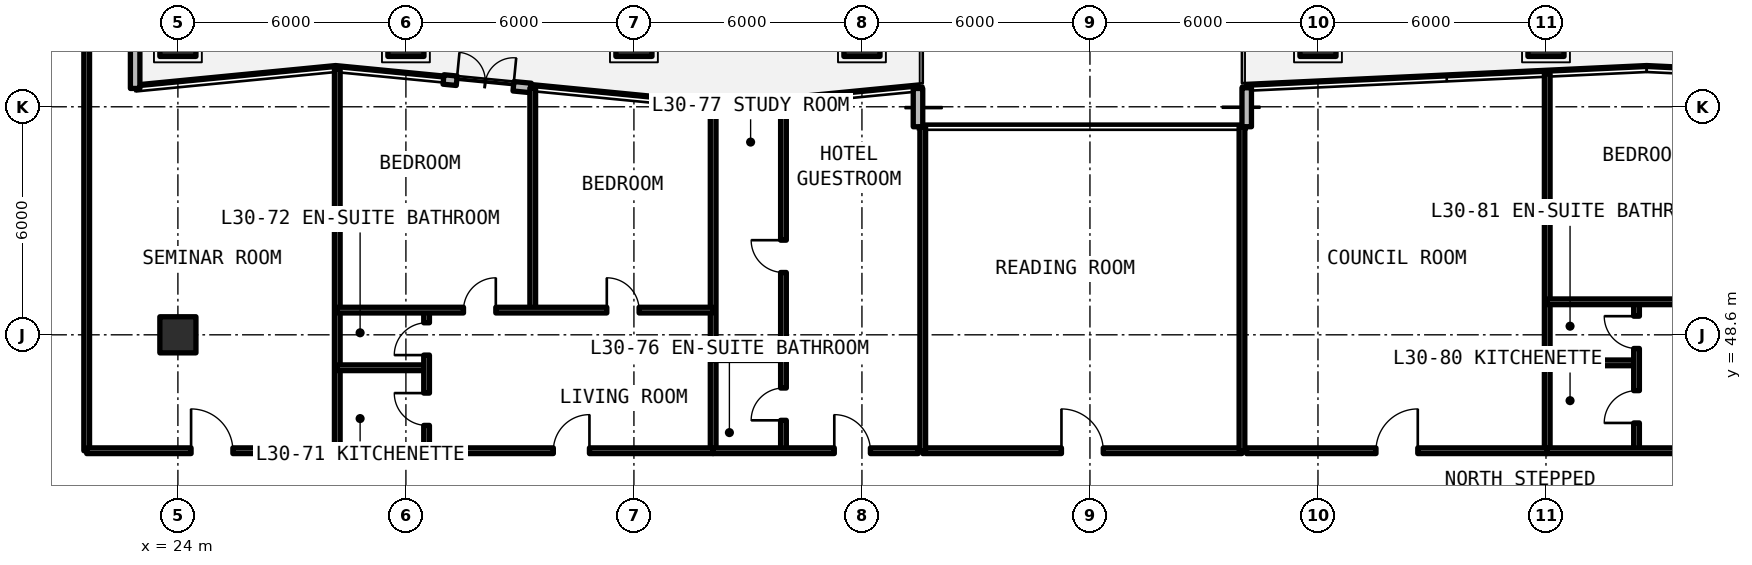
"""IFC4 building model, lengths in metres.
Left out: names, types, materials, properties, quantities, classifications, styles, units other than length and angle.
Written with IfcOpenShell. Run it as: python <this file> out.ifc"""

import sys

from ifc_helpers import new_model, si_unit, direction, frame, frame_2d, origin, origin_2d, place, context, subcontext, project, spatial, rectangle, extrude, element, fill, save


model = new_model("IFC4")
c1 = context("Model", 3, precision=1e-05, world=origin(), true_north=direction((0.0, 1.0)))
c2 = subcontext(c1, "Body", "Model", "MODEL_VIEW")
j1 = project(units=[si_unit("LENGTHUNIT", "METRE"), si_unit("PLANEANGLEUNIT", "RADIAN")], contexts=[c1])
p1 = place(None, origin())
s1 = spatial("IfcSite", under=j1, at=p1, CompositionType="ELEMENT")
p2 = place(p1, origin())
s2 = spatial("IfcBuilding", under=s1, at=p2, CompositionType="ELEMENT")
p3 = place(p2, frame((0.0, 0.0, 108.57)))
s3 = spatial("IfcBuildingStorey", under=s2, at=p3, CompositionType="ELEMENT", Elevation=108.57)
for number, where, z_axis, x_axis in (
    (1, (24.0, 48.6, 0.0), (0.0, 0.0, 1.0), (1.0, 0.0, 0.0)),
    (2, (24.0, 56.4, 0.0), (0.0, 0.0, 1.0), (1.0, 0.0, 0.0)),
    (3, (30.0, 56.4, 0.0), (0.0, 0.0, 1.0), (1.0, 0.0, 0.0)),
    (4, (36.0, 56.4, 0.0), (0.0, 0.0, 1.0), (1.0, 0.0, 0.0)),
    (5, (42.0, 56.4, 0.0), (0.0, 0.0, 1.0), (1.0, 0.0, 0.0)),
    (6, (54.0, 56.4, 0.0), (0.0, 0.0, 1.0), (1.0, 0.0, 0.0)),
    (7, (60.0, 56.4, 0.0), (0.0, 0.0, 1.0), (1.0, 0.0, 0.0)),
):
    element("IfcColumn", number, at=place(p3, frame(where, z_axis=z_axis, x_axis=x_axis)), inside=s3, PredefinedType="COLUMN", context=c2, shape_type="SweptSolid", body=[
        extrude(rectangle(XDim=0.95, YDim=0.95, at=origin_2d()), origin(), (0.0, 0.0, 1.0), 3.63),
    ])
p4 = place(p3, frame((52.125, 55.101, 0.0), z_axis=(0.0, 0.0, 1.0), x_axis=(0.0, -1.0, 0.0)))
e8 = element("IfcWall", 8, at=p4, inside=s3, PredefinedType="SOLIDWALL", context=c2, shape_type="SweptSolid", body=[
    extrude(rectangle(XDim=1.026, YDim=0.25, at=frame_2d((0.513, 0.0))), origin(), (0.0, 0.0, 1.0), 3.41),
])
p5 = place(p3, frame((43.475, 54.075, 0.0), z_axis=(0.0, 0.0, 1.0), x_axis=(0.0, 1.0, 0.0)))
e9 = element("IfcWall", 9, at=p5, inside=s3, PredefinedType="SOLIDWALL", context=c2, shape_type="SweptSolid", body=[
    extrude(rectangle(XDim=1.007, YDim=0.25, at=frame_2d((0.504, 0.0))), origin(), (0.0, 0.0, 1.0), 3.41),
])
p6 = place(p3, frame((33.288, 55.096, 0.0), z_axis=(0.0, 0.0, 1.0), x_axis=(-0.995322842245, 0.096604553235, 0.0)))
e10 = element("IfcWall", 10, at=p6, inside=s3, PredefinedType="SOLIDWALL", context=c2, shape_type="SweptSolid", body=[
    extrude(rectangle(XDim=2.31, YDim=0.25, at=frame_2d((1.155, 0.0))), origin(), (0.0, 0.0, 1.0), 3.41),
])
p7 = place(p6, frame((0.46, 0.0, 0.0)))
e11 = element("IfcOpeningElement", 11, at=p7, cuts=e10, PredefinedType="OPENING", context=c2, shape_type="SweptSolid", body=[
    extrude(rectangle(XDim=1.5, YDim=2.2, at=frame_2d((0.75, 1.1))), frame((0.0, 0.135, 0.0), z_axis=(0.0, -1.0, 0.0), x_axis=(1.0, 0.0, 0.0)), (0.0, 0.0, 1.0), 0.27),
])
p8 = place(p3, frame((22.875, 55.082, 0.0), z_axis=(0.0, 0.0, 1.0), x_axis=(0.0, 1.0, 0.0)))
e12 = element("IfcWall", 12, at=p8, inside=s3, PredefinedType="SOLIDWALL", context=c2, shape_type="SweptSolid", body=[
    extrude(rectangle(XDim=2.393, YDim=0.25, at=frame_2d((1.196, 0.0))), origin(), (0.0, 0.0, 1.0), 3.41),
])
p9 = place(p3, frame((43.6, 45.55, 0.0), z_axis=(0.0, 0.0, 1.0), x_axis=(1.0, 0.0, 0.0)))
e13 = element("IfcWall", 13, at=p9, inside=s3, PredefinedType="SOLIDWALL", context=c2, shape_type="SweptSolid", body=[
    extrude(rectangle(XDim=8.4, YDim=0.15, at=frame_2d((4.2, 0.0))), origin(), (0.0, 0.0, 1.0), 2.63),
])
p10 = place(p9, frame((3.65, 0.0, 0.0)))
e14 = element("IfcOpeningElement", 14, at=p10, cuts=e13, PredefinedType="OPENING", context=c2, shape_type="SweptSolid", body=[
    extrude(rectangle(XDim=1.1, YDim=2.15, at=frame_2d((0.55, 1.075))), frame((0.0, 0.085, 0.0), z_axis=(0.0, -1.0, 0.0), x_axis=(1.0, 0.0, 0.0)), (0.0, 0.0, 1.0), 0.17),
])
for number, where, z_axis, x_axis in (
    (15, (43.6, 45.55, 0.0), (0.0, 0.0, 1.0), (0.0, 1.0, 0.0)),
    (16, (52.0, 45.55, 0.0), (0.0, 0.0, 1.0), (0.0, 1.0, 0.0)),
):
    element("IfcWall", number, at=place(p3, frame(where, z_axis=z_axis, x_axis=x_axis)), inside=s3, PredefinedType="SOLIDWALL", context=c2, shape_type="SweptSolid", body=[
        extrude(rectangle(XDim=8.525, YDim=0.15, at=frame_2d((4.262, 0.0))), origin(), (0.0, 0.0, 1.0), 2.63),
    ])
p11 = place(p3, frame((21.6, 45.55, 0.0), z_axis=(0.0, 0.0, 1.0), x_axis=(0.0, 1.0, 0.0)))
e17 = element("IfcWall", 17, at=p11, inside=s3, PredefinedType="SOLIDWALL", context=c2, shape_type="SweptSolid", body=[
    extrude(rectangle(XDim=11.925, YDim=0.15, at=frame_2d((5.962, 0.0))), origin(), (0.0, 0.0, 1.0), 2.63),
])
p12 = place(p3, frame((28.194, 45.55, 0.0), z_axis=(0.0, 0.0, 1.0), x_axis=(0.0, 1.0, 0.0)))
e18 = element("IfcWall", 18, at=p12, inside=s3, PredefinedType="SOLIDWALL", context=c2, shape_type="SweptSolid", body=[
    extrude(rectangle(XDim=10.04, YDim=0.15, at=frame_2d((5.02, 0.0))), origin(), (0.0, 0.0, 1.0), 2.63),
])
p13 = place(p3, frame((21.6, 45.55, 0.0), z_axis=(0.0, 0.0, 1.0), x_axis=(1.0, 0.0, 0.0)))
e19 = element("IfcWall", 19, at=p13, inside=s3, PredefinedType="SOLIDWALL", context=c2, shape_type="SweptSolid", body=[
    extrude(rectangle(XDim=6.594, YDim=0.15, at=frame_2d((3.297, 0.0))), origin(), (0.0, 0.0, 1.0), 2.63),
])
p14 = place(p13, frame((2.747, 0.0, 0.0)))
e20 = element("IfcOpeningElement", 20, at=p14, cuts=e19, PredefinedType="OPENING", context=c2, shape_type="SweptSolid", body=[
    extrude(rectangle(XDim=1.1, YDim=2.15, at=frame_2d((0.55, 1.075))), frame((0.0, 0.085, 0.0), z_axis=(0.0, -1.0, 0.0), x_axis=(1.0, 0.0, 0.0)), (0.0, 0.0, 1.0), 0.17),
])
p15 = place(p3, frame((38.085, 45.55, 0.0), z_axis=(0.0, 0.0, 1.0), x_axis=(0.0, 1.0, 0.0)))
e21 = element("IfcWall", 21, at=p15, inside=s3, PredefinedType="SOLIDWALL", context=c2, shape_type="SweptSolid", body=[
    extrude(rectangle(XDim=9.08, YDim=0.15, at=frame_2d((4.54, 0.0))), origin(), (0.0, 0.0, 1.0), 2.63),
])
p16 = place(p3, frame((28.194, 47.733, 0.0), z_axis=(0.0, 0.0, 1.0), x_axis=(1.0, 0.0, 0.0)))
e22 = element("IfcWall", 22, at=p16, inside=s3, PredefinedType="PARTITIONING", context=c2, shape_type="SweptSolid", body=[
    extrude(rectangle(XDim=2.35, YDim=0.15, at=frame_2d((1.175, 0.0))), origin(), (0.0, 0.0, 1.0), 2.63),
])
p17 = place(p3, frame((30.544, 45.55, 0.0), z_axis=(0.0, 0.0, 1.0), x_axis=(0.0, 1.0, 0.0)))
e23 = element("IfcWall", 23, at=p17, inside=s3, PredefinedType="PARTITIONING", context=c2, shape_type="SweptSolid", body=[
    extrude(rectangle(XDim=3.7, YDim=0.15, at=frame_2d((1.85, 0.0))), origin(), (0.0, 0.0, 1.0), 2.63),
])
p18 = place(p17, frame((0.667, 0.0, 0.0)))
e24 = element("IfcOpeningElement", 24, at=p18, cuts=e23, PredefinedType="OPENING", context=c2, shape_type="SweptSolid", body=[
    extrude(rectangle(XDim=0.85, YDim=2.1, at=frame_2d((0.425, 1.05))), frame((0.0, 0.085, 0.0), z_axis=(0.0, -1.0, 0.0), x_axis=(1.0, 0.0, 0.0)), (0.0, 0.0, 1.0), 0.17),
])
p19 = place(p17, frame((2.517, 0.0, 0.0)))
e25 = element("IfcOpeningElement", 25, at=p19, cuts=e23, PredefinedType="OPENING", context=c2, shape_type="SweptSolid", body=[
    extrude(rectangle(XDim=0.85, YDim=2.1, at=frame_2d((0.425, 1.05))), frame((0.0, 0.085, 0.0), z_axis=(0.0, -1.0, 0.0), x_axis=(1.0, 0.0, 0.0)), (0.0, 0.0, 1.0), 0.17),
])
p20 = place(p3, frame((33.337, 49.25, 0.0), z_axis=(0.0, 0.0, 1.0), x_axis=(0.0, 1.0, 0.0)))
e26 = element("IfcWall", 26, at=p20, inside=s3, PredefinedType="PARTITIONING", context=c2, shape_type="SweptSolid", body=[
    extrude(rectangle(XDim=5.841, YDim=0.15, at=frame_2d((2.92, 0.0))), origin(), (0.0, 0.0, 1.0), 2.63),
])
p21 = place(p3, frame((28.194, 49.25, 0.0), z_axis=(0.0, 0.0, 1.0), x_axis=(1.0, 0.0, 0.0)))
e27 = element("IfcWall", 27, at=p21, inside=s3, PredefinedType="PARTITIONING", context=c2, shape_type="SweptSolid", body=[
    extrude(rectangle(XDim=9.891, YDim=0.15, at=frame_2d((4.945, 0.0))), origin(), (0.0, 0.0, 1.0), 2.63),
])
p22 = place(p21, frame((3.322, 0.0, 0.0)))
e28 = element("IfcOpeningElement", 28, at=p22, cuts=e27, PredefinedType="OPENING", context=c2, shape_type="SweptSolid", body=[
    extrude(rectangle(XDim=0.85, YDim=2.1, at=frame_2d((0.425, 1.05))), frame((0.0, 0.085, 0.0), z_axis=(0.0, -1.0, 0.0), x_axis=(1.0, 0.0, 0.0)), (0.0, 0.0, 1.0), 0.17),
])
p23 = place(p21, frame((7.092, 0.0, 0.0)))
e29 = element("IfcOpeningElement", 29, at=p23, cuts=e27, PredefinedType="OPENING", context=c2, shape_type="SweptSolid", body=[
    extrude(rectangle(XDim=0.85, YDim=2.1, at=frame_2d((0.425, 1.05))), frame((0.0, 0.085, 0.0), z_axis=(0.0, -1.0, 0.0), x_axis=(1.0, 0.0, 0.0)), (0.0, 0.0, 1.0), 0.17),
])
p24 = place(p3, frame((28.194, 45.55, 0.0), z_axis=(0.0, 0.0, 1.0), x_axis=(1.0, 0.0, 0.0)))
e30 = element("IfcWall", 30, at=p24, inside=s3, PredefinedType="SOLIDWALL", context=c2, shape_type="SweptSolid", body=[
    extrude(rectangle(XDim=9.891, YDim=0.15, at=frame_2d((4.945, 0.0))), origin(), (0.0, 0.0, 1.0), 2.63),
])
p25 = place(p24, frame((5.686, 0.0, 0.0)))
e31 = element("IfcOpeningElement", 31, at=p25, cuts=e30, PredefinedType="OPENING", context=c2, shape_type="SweptSolid", body=[
    extrude(rectangle(XDim=0.95, YDim=2.15, at=frame_2d((0.475, 1.075))), frame((0.0, 0.085, 0.0), z_axis=(0.0, -1.0, 0.0), x_axis=(1.0, 0.0, 0.0)), (0.0, 0.0, 1.0), 0.17),
])
p26 = place(p3, frame((38.085, 48.0, 0.0), z_axis=(0.0, 0.0, 1.0), x_axis=(1.0, 0.0, 0.0)))
e32 = element("IfcWall", 32, at=p26, inside=s3, PredefinedType="PARTITIONING", context=c2, shape_type="SweptSolid", body=[
    extrude(rectangle(XDim=1.85, YDim=0.15, at=frame_2d((0.925, 0.0))), origin(), (0.0, 0.0, 1.0), 2.63),
])
p27 = place(p3, frame((39.935, 45.55, 0.0), z_axis=(0.0, 0.0, 1.0), x_axis=(0.0, 1.0, 0.0)))
e33 = element("IfcWall", 33, at=p27, inside=s3, PredefinedType="PARTITIONING", context=c2, shape_type="SweptSolid", body=[
    extrude(rectangle(XDim=9.188, YDim=0.15, at=frame_2d((4.594, 0.0))), origin(), (0.0, 0.0, 1.0), 2.63),
])
p28 = place(p27, frame((0.8, 0.0, 0.0)))
e34 = element("IfcOpeningElement", 34, at=p28, cuts=e33, PredefinedType="OPENING", context=c2, shape_type="SweptSolid", body=[
    extrude(rectangle(XDim=0.85, YDim=2.1, at=frame_2d((0.425, 1.05))), frame((0.0, 0.085, 0.0), z_axis=(0.0, -1.0, 0.0), x_axis=(1.0, 0.0, 0.0)), (0.0, 0.0, 1.0), 0.17),
])
p29 = place(p27, frame((4.69, 0.0, 0.0)))
e35 = element("IfcOpeningElement", 35, at=p29, cuts=e33, PredefinedType="OPENING", context=c2, shape_type="SweptSolid", body=[
    extrude(rectangle(XDim=0.85, YDim=2.1, at=frame_2d((0.425, 1.05))), frame((0.0, 0.085, 0.0), z_axis=(0.0, -1.0, 0.0), x_axis=(1.0, 0.0, 0.0)), (0.0, 0.0, 1.0), 0.17),
])
p30 = place(p3, frame((38.085, 45.55, 0.0), z_axis=(0.0, 0.0, 1.0), x_axis=(1.0, 0.0, 0.0)))
e36 = element("IfcWall", 36, at=p30, inside=s3, PredefinedType="SOLIDWALL", context=c2, shape_type="SweptSolid", body=[
    extrude(rectangle(XDim=5.395, YDim=0.15, at=frame_2d((2.698, 0.0))), origin(), (0.0, 0.0, 1.0), 2.63),
])
p31 = place(p30, frame((3.188, 0.0, 0.0)))
e37 = element("IfcOpeningElement", 37, at=p31, cuts=e36, PredefinedType="OPENING", context=c2, shape_type="SweptSolid", body=[
    extrude(rectangle(XDim=0.95, YDim=2.15, at=frame_2d((0.475, 1.075))), frame((0.0, 0.085, 0.0), z_axis=(0.0, -1.0, 0.0), x_axis=(1.0, 0.0, 0.0)), (0.0, 0.0, 1.0), 0.17),
])
p32 = place(p3, frame((60.033, 45.55, 0.0), z_axis=(0.0, 0.0, 1.0), x_axis=(0.0, 1.0, 0.0)))
e38 = element("IfcWall", 38, at=p32, inside=s3, PredefinedType="SOLIDWALL", context=c2, shape_type="SweptSolid", body=[
    extrude(rectangle(XDim=9.922, YDim=0.15, at=frame_2d((4.961, 0.0))), origin(), (0.0, 0.0, 1.0), 2.63),
])
p33 = place(p3, frame((52.12, 45.55, 0.0), z_axis=(0.0, 0.0, 1.0), x_axis=(1.0, 0.0, 0.0)))
e39 = element("IfcWall", 39, at=p33, inside=s3, PredefinedType="SOLIDWALL", context=c2, shape_type="SweptSolid", body=[
    extrude(rectangle(XDim=7.913, YDim=0.15, at=frame_2d((3.956, 0.0))), origin(), (0.0, 0.0, 1.0), 2.63),
])
p34 = place(p33, frame((3.406, 0.0, 0.0)))
e40 = element("IfcOpeningElement", 40, at=p34, cuts=e39, PredefinedType="OPENING", context=c2, shape_type="SweptSolid", body=[
    extrude(rectangle(XDim=1.1, YDim=2.15, at=frame_2d((0.55, 1.075))), frame((0.0, 0.085, 0.0), z_axis=(0.0, -1.0, 0.0), x_axis=(1.0, 0.0, 0.0)), (0.0, 0.0, 1.0), 0.17),
])
p35 = place(p3, frame((60.033, 47.862, 0.0), z_axis=(0.0, 0.0, 1.0), x_axis=(1.0, 0.0, 0.0)))
e41 = element("IfcWall", 41, at=p35, inside=s3, PredefinedType="PARTITIONING", context=c2, shape_type="SweptSolid", body=[
    extrude(rectangle(XDim=2.35, YDim=0.15, at=frame_2d((1.175, 0.0))), origin(), (0.0, 0.0, 1.0), 2.63),
])
p36 = place(p3, frame((62.383, 45.55, 0.0), z_axis=(0.0, 0.0, 1.0), x_axis=(0.0, 1.0, 0.0)))
e42 = element("IfcWall", 42, at=p36, inside=s3, PredefinedType="PARTITIONING", context=c2, shape_type="SweptSolid", body=[
    extrude(rectangle(XDim=3.918, YDim=0.15, at=frame_2d((1.959, 0.0))), origin(), (0.0, 0.0, 1.0), 2.63),
])
p37 = place(p36, frame((0.731, 0.0, 0.0)))
e43 = element("IfcOpeningElement", 43, at=p37, cuts=e42, PredefinedType="OPENING", context=c2, shape_type="SweptSolid", body=[
    extrude(rectangle(XDim=0.85, YDim=2.1, at=frame_2d((0.425, 1.05))), frame((0.0, 0.085, 0.0), z_axis=(0.0, -1.0, 0.0), x_axis=(1.0, 0.0, 0.0)), (0.0, 0.0, 1.0), 0.17),
])
p38 = place(p36, frame((2.69, 0.0, 0.0)))
e44 = element("IfcOpeningElement", 44, at=p38, cuts=e42, PredefinedType="OPENING", context=c2, shape_type="SweptSolid", body=[
    extrude(rectangle(XDim=0.85, YDim=2.1, at=frame_2d((0.425, 1.05))), frame((0.0, 0.085, 0.0), z_axis=(0.0, -1.0, 0.0), x_axis=(1.0, 0.0, 0.0)), (0.0, 0.0, 1.0), 0.17),
])
p39 = place(p3, frame((60.033, 49.469, 0.0), z_axis=(0.0, 0.0, 1.0), x_axis=(1.0, 0.0, 0.0)))
e45 = element("IfcWall", 45, at=p39, inside=s3, PredefinedType="PARTITIONING", context=c2, shape_type="SweptSolid", body=[
    extrude(rectangle(XDim=10.551, YDim=0.15, at=frame_2d((5.275, 0.0))), origin(), (0.0, 0.0, 1.0), 2.63),
])
p40 = place(p39, frame((3.493, 0.0, 0.0)))
e46 = element("IfcOpeningElement", 46, at=p40, cuts=e45, PredefinedType="OPENING", context=c2, shape_type="SweptSolid", body=[
    extrude(rectangle(XDim=0.85, YDim=2.1, at=frame_2d((0.425, 1.05))), frame((0.0, 0.085, 0.0), z_axis=(0.0, -1.0, 0.0), x_axis=(1.0, 0.0, 0.0)), (0.0, 0.0, 1.0), 0.17),
])
p41 = place(p39, frame((7.593, 0.0, 0.0)))
e47 = element("IfcOpeningElement", 47, at=p41, cuts=e45, PredefinedType="OPENING", context=c2, shape_type="SweptSolid", body=[
    extrude(rectangle(XDim=0.85, YDim=2.1, at=frame_2d((0.425, 1.05))), frame((0.0, 0.085, 0.0), z_axis=(0.0, -1.0, 0.0), x_axis=(1.0, 0.0, 0.0)), (0.0, 0.0, 1.0), 0.17),
])
p42 = place(p3, frame((60.033, 45.55, 0.0), z_axis=(0.0, 0.0, 1.0), x_axis=(1.0, 0.0, 0.0)))
e48 = element("IfcWall", 48, at=p42, inside=s3, PredefinedType="SOLIDWALL", context=c2, shape_type="SweptSolid", body=[
    extrude(rectangle(XDim=10.551, YDim=0.15, at=frame_2d((5.275, 0.0))), origin(), (0.0, 0.0, 1.0), 2.63),
])
p43 = place(p42, frame((6.015, 0.0, 0.0)))
e49 = element("IfcOpeningElement", 49, at=p43, cuts=e48, PredefinedType="OPENING", context=c2, shape_type="SweptSolid", body=[
    extrude(rectangle(XDim=0.95, YDim=2.15, at=frame_2d((0.475, 1.075))), frame((0.0, 0.085, 0.0), z_axis=(0.0, -1.0, 0.0), x_axis=(1.0, 0.0, 0.0)), (0.0, 0.0, 1.0), 0.17),
])
p44 = place(p7, frame((1.5, 0.0, 0.0), z_axis=(0.0, 0.0, 1.0), x_axis=(-1.0, 0.0, 0.0)))
e50 = element("IfcDoor", 50, at=p44, inside=s3, OperationType="SINGLE_SWING_LEFT", PredefinedType="DOOR", context=c2, shape_type="SweptSolid", body=[
    extrude(rectangle(XDim=1.5, YDim=2.2, at=frame_2d((0.75, 1.1))), frame((0.0, 0.025, 0.0), z_axis=(0.0, -1.0, 0.0), x_axis=(1.0, 0.0, 0.0)), (0.0, 0.0, 1.0), 0.05),
])
fill(e11, e50)
p45 = place(p10, origin())
e51 = element("IfcDoor", 51, at=p45, inside=s3, OperationType="SINGLE_SWING_LEFT", PredefinedType="DOOR", context=c2, shape_type="SweptSolid", body=[
    extrude(rectangle(XDim=1.1, YDim=2.15, at=frame_2d((0.55, 1.075))), frame((0.0, 0.025, 0.0), z_axis=(0.0, -1.0, 0.0), x_axis=(1.0, 0.0, 0.0)), (0.0, 0.0, 1.0), 0.05),
])
fill(e14, e51)
p46 = place(p14, origin())
e52 = element("IfcDoor", 52, at=p46, inside=s3, OperationType="SINGLE_SWING_LEFT", PredefinedType="DOOR", context=c2, shape_type="SweptSolid", body=[
    extrude(rectangle(XDim=1.1, YDim=2.15, at=frame_2d((0.55, 1.075))), frame((0.0, 0.025, 0.0), z_axis=(0.0, -1.0, 0.0), x_axis=(1.0, 0.0, 0.0)), (0.0, 0.0, 1.0), 0.05),
])
fill(e20, e52)
p47 = place(p18, origin())
e53 = element("IfcDoor", 53, at=p47, inside=s3, OperationType="SINGLE_SWING_RIGHT", PredefinedType="DOOR", context=c2, shape_type="SweptSolid", body=[
    extrude(rectangle(XDim=0.85, YDim=2.1, at=frame_2d((0.425, 1.05))), frame((0.0, 0.025, 0.0), z_axis=(0.0, -1.0, 0.0), x_axis=(1.0, 0.0, 0.0)), (0.0, 0.0, 1.0), 0.05),
])
fill(e24, e53)
p48 = place(p19, origin())
e54 = element("IfcDoor", 54, at=p48, inside=s3, OperationType="SINGLE_SWING_LEFT", PredefinedType="DOOR", context=c2, shape_type="SweptSolid", body=[
    extrude(rectangle(XDim=0.85, YDim=2.1, at=frame_2d((0.425, 1.05))), frame((0.0, 0.025, 0.0), z_axis=(0.0, -1.0, 0.0), x_axis=(1.0, 0.0, 0.0)), (0.0, 0.0, 1.0), 0.05),
])
fill(e25, e54)
p49 = place(p22, origin())
e55 = element("IfcDoor", 55, at=p49, inside=s3, OperationType="SINGLE_SWING_RIGHT", PredefinedType="DOOR", context=c2, shape_type="SweptSolid", body=[
    extrude(rectangle(XDim=0.85, YDim=2.1, at=frame_2d((0.425, 1.05))), frame((0.0, 0.025, 0.0), z_axis=(0.0, -1.0, 0.0), x_axis=(1.0, 0.0, 0.0)), (0.0, 0.0, 1.0), 0.05),
])
fill(e28, e55)
p50 = place(p23, origin())
e56 = element("IfcDoor", 56, at=p50, inside=s3, OperationType="SINGLE_SWING_LEFT", PredefinedType="DOOR", context=c2, shape_type="SweptSolid", body=[
    extrude(rectangle(XDim=0.85, YDim=2.1, at=frame_2d((0.425, 1.05))), frame((0.0, 0.025, 0.0), z_axis=(0.0, -1.0, 0.0), x_axis=(1.0, 0.0, 0.0)), (0.0, 0.0, 1.0), 0.05),
])
fill(e29, e56)
p51 = place(p25, origin())
e57 = element("IfcDoor", 57, at=p51, inside=s3, OperationType="SINGLE_SWING_RIGHT", PredefinedType="DOOR", context=c2, shape_type="SweptSolid", body=[
    extrude(rectangle(XDim=0.95, YDim=2.15, at=frame_2d((0.475, 1.075))), frame((0.0, 0.025, 0.0), z_axis=(0.0, -1.0, 0.0), x_axis=(1.0, 0.0, 0.0)), (0.0, 0.0, 1.0), 0.05),
])
fill(e31, e57)
p52 = place(p28, origin())
e58 = element("IfcDoor", 58, at=p52, inside=s3, OperationType="SINGLE_SWING_LEFT", PredefinedType="DOOR", context=c2, shape_type="SweptSolid", body=[
    extrude(rectangle(XDim=0.85, YDim=2.1, at=frame_2d((0.425, 1.05))), frame((0.0, 0.025, 0.0), z_axis=(0.0, -1.0, 0.0), x_axis=(1.0, 0.0, 0.0)), (0.0, 0.0, 1.0), 0.05),
])
fill(e34, e58)
p53 = place(p29, origin())
e59 = element("IfcDoor", 59, at=p53, inside=s3, OperationType="SINGLE_SWING_RIGHT", PredefinedType="DOOR", context=c2, shape_type="SweptSolid", body=[
    extrude(rectangle(XDim=0.85, YDim=2.1, at=frame_2d((0.425, 1.05))), frame((0.0, 0.025, 0.0), z_axis=(0.0, -1.0, 0.0), x_axis=(1.0, 0.0, 0.0)), (0.0, 0.0, 1.0), 0.05),
])
fill(e35, e59)
p54 = place(p31, origin())
e60 = element("IfcDoor", 60, at=p54, inside=s3, OperationType="SINGLE_SWING_LEFT", PredefinedType="DOOR", context=c2, shape_type="SweptSolid", body=[
    extrude(rectangle(XDim=0.95, YDim=2.15, at=frame_2d((0.475, 1.075))), frame((0.0, 0.025, 0.0), z_axis=(0.0, -1.0, 0.0), x_axis=(1.0, 0.0, 0.0)), (0.0, 0.0, 1.0), 0.05),
])
fill(e37, e60)
p55 = place(p34, origin())
e61 = element("IfcDoor", 61, at=p55, inside=s3, OperationType="SINGLE_SWING_RIGHT", PredefinedType="DOOR", context=c2, shape_type="SweptSolid", body=[
    extrude(rectangle(XDim=1.1, YDim=2.15, at=frame_2d((0.55, 1.075))), frame((0.0, 0.025, 0.0), z_axis=(0.0, -1.0, 0.0), x_axis=(1.0, 0.0, 0.0)), (0.0, 0.0, 1.0), 0.05),
])
fill(e40, e61)
p56 = place(p37, origin())
e62 = element("IfcDoor", 62, at=p56, inside=s3, OperationType="SINGLE_SWING_LEFT", PredefinedType="DOOR", context=c2, shape_type="SweptSolid", body=[
    extrude(rectangle(XDim=0.85, YDim=2.1, at=frame_2d((0.425, 1.05))), frame((0.0, 0.025, 0.0), z_axis=(0.0, -1.0, 0.0), x_axis=(1.0, 0.0, 0.0)), (0.0, 0.0, 1.0), 0.05),
])
fill(e43, e62)
p57 = place(p38, origin())
e63 = element("IfcDoor", 63, at=p57, inside=s3, OperationType="SINGLE_SWING_RIGHT", PredefinedType="DOOR", context=c2, shape_type="SweptSolid", body=[
    extrude(rectangle(XDim=0.85, YDim=2.1, at=frame_2d((0.425, 1.05))), frame((0.0, 0.025, 0.0), z_axis=(0.0, -1.0, 0.0), x_axis=(1.0, 0.0, 0.0)), (0.0, 0.0, 1.0), 0.05),
])
fill(e44, e63)
save(model, sys.argv[1])
